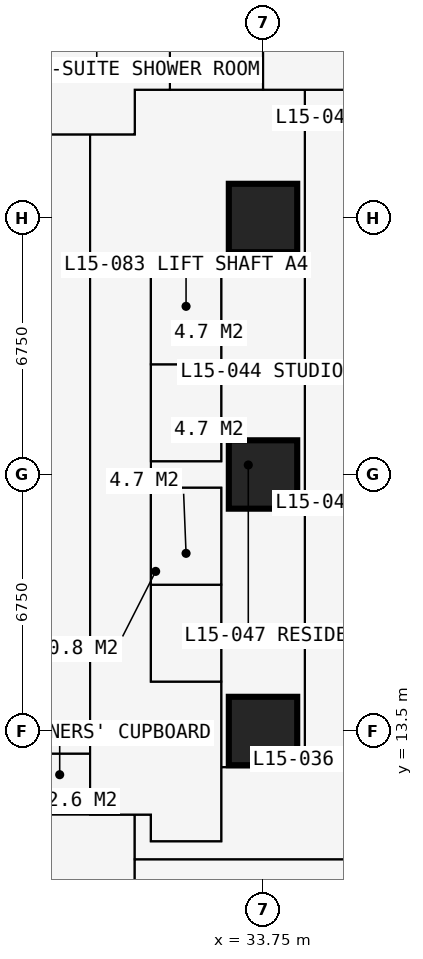
"""IFC4 building model, lengths in metres.
Left out: names, types, materials, properties, quantities, classifications, styles, units other than length and angle.
Written with IfcOpenShell. Run it as: python <this file> out.ifc"""

import sys

from ifc_helpers import new_model, si_unit, direction, frame, frame_2d, origin, origin_2d, place, context, subcontext, project, spatial, rectangle, extrude, element, fill, save


model = new_model("IFC4")
c1 = context("Model", 3, precision=1e-05, world=origin(), true_north=direction((0.0, 1.0)))
c2 = subcontext(c1, "Body", "Model", "MODEL_VIEW")
j1 = project(units=[si_unit("LENGTHUNIT", "METRE"), si_unit("PLANEANGLEUNIT", "RADIAN")], contexts=[c1])
p1 = place(None, origin())
s1 = spatial("IfcSite", under=j1, at=p1, CompositionType="ELEMENT")
p2 = place(p1, origin())
s2 = spatial("IfcBuilding", under=s1, at=p2, CompositionType="ELEMENT")
p3 = place(p2, frame((0.0, 0.0, 57.6)))
s3 = spatial("IfcBuildingStorey", under=s2, at=p3, CompositionType="ELEMENT", Elevation=57.6)
for number, where, z_axis, x_axis in (
    (1, (33.75, 13.5, 0.0), (0.0, 0.0, 1.0), (1.0, 0.0, 0.0)),
    (2, (33.75, 20.25, 0.0), (0.0, 0.0, 1.0), (1.0, 0.0, 0.0)),
    (3, (33.75, 27.0, 0.0), (0.0, 0.0, 1.0), (1.0, 0.0, 0.0)),
):
    element("IfcColumn", number, at=place(p3, frame(where, z_axis=z_axis, x_axis=x_axis)), inside=s3, PredefinedType="COLUMN", context=c2, shape_type="SweptSolid", body=[
        extrude(rectangle(XDim=1.8, YDim=1.8, at=origin_2d()), origin(), (0.0, 0.0, 1.0), 3.6),
    ])
p4 = place(p3, frame((10.125, 11.3, 0.0), z_axis=(0.0, 0.0, 1.0), x_axis=(1.0, 0.0, 0.0)))
e4 = element("IfcWall", 4, at=p4, inside=s3, PredefinedType="PARTITIONING", context=c2, shape_type="SweptSolid", body=[
    extrude(rectangle(XDim=20.675, YDim=0.15, at=frame_2d((10.337, 0.0))), origin(), (0.0, 0.0, 1.0), 3.375),
])
p5 = place(p4, frame((8.375, 0.0, 0.0)))
e5 = element("IfcOpeningElement", 5, at=p5, cuts=e4, PredefinedType="OPENING", context=c2, shape_type="SweptSolid", body=[
    extrude(rectangle(XDim=1.0, YDim=2.2, at=frame_2d((0.5, 1.1))), frame((0.0, 0.085, 0.0), z_axis=(0.0, -1.0, 0.0), x_axis=(1.0, 0.0, 0.0)), (0.0, 0.0, 1.0), 0.17),
])
p6 = place(p4, frame((10.975, 0.0, 0.0)))
e6 = element("IfcOpeningElement", 6, at=p6, cuts=e4, PredefinedType="OPENING", context=c2, shape_type="SweptSolid", body=[
    extrude(rectangle(XDim=1.0, YDim=2.2, at=frame_2d((0.5, 1.1))), frame((0.0, 0.085, 0.0), z_axis=(0.0, -1.0, 0.0), x_axis=(1.0, 0.0, 0.0)), (0.0, 0.0, 1.0), 0.17),
])
p7 = place(p4, frame((3.925, 0.0, 0.0)))
e7 = element("IfcOpeningElement", 7, at=p7, cuts=e4, PredefinedType="OPENING", context=c2, shape_type="SweptSolid", body=[
    extrude(rectangle(XDim=0.95, YDim=2.2, at=frame_2d((0.475, 1.1))), frame((0.0, 0.085, 0.0), z_axis=(0.0, -1.0, 0.0), x_axis=(1.0, 0.0, 0.0)), (0.0, 0.0, 1.0), 0.17),
])
p8 = place(p3, frame((11.3, 29.2, 0.0), z_axis=(0.0, 0.0, 1.0), x_axis=(1.0, 0.0, 0.0)))
e8 = element("IfcWall", 8, at=p8, inside=s3, PredefinedType="PARTITIONING", context=c2, shape_type="SweptSolid", body=[
    extrude(rectangle(XDim=19.075, YDim=0.15, at=frame_2d((9.538, 0.0))), origin(), (0.0, 0.0, 1.0), 3.375),
])
p9 = place(p8, frame((12.875, 0.0, 0.0)))
e9 = element("IfcOpeningElement", 9, at=p9, cuts=e8, PredefinedType="OPENING", context=c2, shape_type="SweptSolid", body=[
    extrude(rectangle(XDim=1.0, YDim=2.2, at=frame_2d((0.5, 1.1))), frame((0.0, 0.085, 0.0), z_axis=(0.0, -1.0, 0.0), x_axis=(1.0, 0.0, 0.0)), (0.0, 0.0, 1.0), 0.17),
])
p10 = place(p8, frame((10.438, 0.0, 0.0)))
e10 = element("IfcOpeningElement", 10, at=p10, cuts=e8, PredefinedType="OPENING", context=c2, shape_type="SweptSolid", body=[
    extrude(rectangle(XDim=1.0, YDim=2.2, at=frame_2d((0.5, 1.1))), frame((0.0, 0.085, 0.0), z_axis=(0.0, -1.0, 0.0), x_axis=(1.0, 0.0, 0.0)), (0.0, 0.0, 1.0), 0.17),
])
p11 = place(p8, frame((15.675, 0.0, 0.0)))
e11 = element("IfcOpeningElement", 11, at=p11, cuts=e8, PredefinedType="OPENING", context=c2, shape_type="SweptSolid", body=[
    extrude(rectangle(XDim=0.95, YDim=2.2, at=frame_2d((0.475, 1.1))), frame((0.0, 0.085, 0.0), z_axis=(0.0, -1.0, 0.0), x_axis=(1.0, 0.0, 0.0)), (0.0, 0.0, 1.0), 0.17),
])
p12 = place(p3, frame((27.6, 12.9, 0.0), z_axis=(0.0, 0.0, 1.0), x_axis=(1.0, 0.0, 0.0)))
e12 = element("IfcWall", 12, at=p12, inside=s3, PredefinedType="PARTITIONING", context=c2, shape_type="SweptSolid", body=[
    extrude(rectangle(XDim=1.6, YDim=0.15, at=frame_2d((0.8, 0.0))), origin(), (0.0, 0.0, 1.0), 2.877),
])
p13 = place(p3, frame((29.2, 11.3, 0.0), z_axis=(0.0, 0.0, 1.0), x_axis=(0.0, 1.0, 0.0)))
e13 = element("IfcWall", 13, at=p13, inside=s3, PredefinedType="PARTITIONING", context=c2, shape_type="SweptSolid", body=[
    extrude(rectangle(XDim=17.9, YDim=0.2, at=frame_2d((8.95, 0.0))), origin(), (0.0, 0.0, 1.0), 3.375),
])
p14 = place(p13, frame((8.35, 0.0, 0.0)))
e14 = element("IfcOpeningElement", 14, at=p14, cuts=e13, PredefinedType="OPENING", context=c2, shape_type="SweptSolid", body=[
    extrude(rectangle(XDim=1.2, YDim=2.2, at=frame_2d((0.6, 1.1))), frame((0.0, 0.11, 0.0), z_axis=(0.0, -1.0, 0.0), x_axis=(1.0, 0.0, 0.0)), (0.0, 0.0, 1.0), 0.22),
])
p15 = place(p3, frame((29.2, 25.7, 0.0), z_axis=(0.0, 0.0, 1.0), x_axis=(1.0, 0.0, 0.0)))
e15 = element("IfcWall", 15, at=p15, inside=s3, PredefinedType="SHEAR", context=c2, shape_type="SweptSolid", body=[
    extrude(rectangle(XDim=3.45, YDim=0.1, at=frame_2d((1.725, 0.0))), origin(), (0.0, 0.0, 1.0), 3.375),
])
p16 = place(p3, frame((30.375, -0.734, 0.0), z_axis=(0.0, 0.0, 1.0), x_axis=(0.0, 1.0, 0.0)))
e16 = element("IfcWall", 16, at=p16, inside=s3, PredefinedType="PARTITIONING", context=c2, shape_type="SweptSolid", body=[
    extrude(rectangle(XDim=12.034, YDim=0.15, at=frame_2d((6.017, 0.0))), origin(), (0.0, 0.0, 1.0), 3.375),
])
p17 = place(p3, frame((30.375, 10.125, 0.0), z_axis=(0.0, 0.0, 1.0), x_axis=(1.0, 0.0, 0.0)))
e17 = element("IfcWall", 17, at=p17, inside=s3, PredefinedType="PARTITIONING", context=c2, shape_type="SweptSolid", body=[
    extrude(rectangle(XDim=10.859, YDim=0.15, at=frame_2d((5.429, 0.0))), origin(), (0.0, 0.0, 1.0), 3.375),
])
p18 = place(p17, frame((2.5, 0.0, 0.0)))
e18 = element("IfcOpeningElement", 18, at=p18, cuts=e17, PredefinedType="OPENING", context=c2, shape_type="SweptSolid", body=[
    extrude(rectangle(XDim=1.0, YDim=2.2, at=frame_2d((0.5, 1.1))), frame((0.0, 0.085, 0.0), z_axis=(0.0, -1.0, 0.0), x_axis=(1.0, 0.0, 0.0)), (0.0, 0.0, 1.0), 0.17),
])
p19 = place(p3, frame((30.375, 29.2, 0.0), z_axis=(0.0, 0.0, 1.0), x_axis=(0.0, 1.0, 0.0)))
e19 = element("IfcWall", 19, at=p19, inside=s3, PredefinedType="PARTITIONING", context=c2, shape_type="SweptSolid", body=[
    extrude(rectangle(XDim=1.175, YDim=0.15, at=frame_2d((0.587, 0.0))), origin(), (0.0, 0.0, 1.0), 3.375),
])
p20 = place(p3, frame((30.375, 30.375, 0.0), z_axis=(0.0, 0.0, 1.0), x_axis=(1.0, 0.0, 0.0)))
e20 = element("IfcWall", 20, at=p20, inside=s3, PredefinedType="PARTITIONING", context=c2, shape_type="SweptSolid", body=[
    extrude(rectangle(XDim=10.859, YDim=0.15, at=frame_2d((5.429, 0.0))), origin(), (0.0, 0.0, 1.0), 3.375),
])
p21 = place(p3, frame((30.8, 10.6, 0.0), z_axis=(0.0, 0.0, 1.0), x_axis=(0.0, 1.0, 0.0)))
e21 = element("IfcWall", 21, at=p21, inside=s3, PredefinedType="PARTITIONING", context=c2, shape_type="SweptSolid", body=[
    extrude(rectangle(XDim=0.7, YDim=0.15, at=frame_2d((0.35, 0.0))), origin(), (0.0, 0.0, 1.0), 3.375),
])
p22 = place(p3, frame((30.8, 10.6, 0.0), z_axis=(0.0, 0.0, 1.0), x_axis=(1.0, 0.0, 0.0)))
e22 = element("IfcWall", 22, at=p22, inside=s3, PredefinedType="PARTITIONING", context=c2, shape_type="SweptSolid", body=[
    extrude(rectangle(XDim=1.85, YDim=0.15, at=frame_2d((0.925, 0.0))), origin(), (0.0, 0.0, 1.0), 3.375),
])
p23 = place(p3, frame((30.8, 14.8, 0.0), z_axis=(0.0, 0.0, 1.0), x_axis=(0.0, 1.0, 0.0)))
e23 = element("IfcWall", 23, at=p23, inside=s3, PredefinedType="PARTITIONING", context=c2, shape_type="SweptSolid", body=[
    extrude(rectangle(XDim=10.9, YDim=0.15, at=frame_2d((5.45, 0.0))), origin(), (0.0, 0.0, 1.0), 3.375),
])
p24 = place(p23, frame((0.75, 0.0, 0.0)))
e24 = element("IfcOpeningElement", 24, at=p24, cuts=e23, PredefinedType="OPENING", context=c2, shape_type="SweptSolid", body=[
    extrude(rectangle(XDim=1.1, YDim=2.2, at=frame_2d((0.55, 1.1))), frame((0.0, 0.085, 0.0), z_axis=(0.0, -1.0, 0.0), x_axis=(1.0, 0.0, 0.0)), (0.0, 0.0, 1.0), 0.17),
])
p25 = place(p23, frame((3.25, 0.0, 0.0)))
e25 = element("IfcOpeningElement", 25, at=p25, cuts=e23, PredefinedType="OPENING", context=c2, shape_type="SweptSolid", body=[
    extrude(rectangle(XDim=1.1, YDim=2.2, at=frame_2d((0.55, 1.1))), frame((0.0, 0.085, 0.0), z_axis=(0.0, -1.0, 0.0), x_axis=(1.0, 0.0, 0.0)), (0.0, 0.0, 1.0), 0.17),
])
p26 = place(p23, frame((6.5, 0.0, 0.0)))
e26 = element("IfcOpeningElement", 26, at=p26, cuts=e23, PredefinedType="OPENING", context=c2, shape_type="SweptSolid", body=[
    extrude(rectangle(XDim=1.1, YDim=2.2, at=frame_2d((0.55, 1.1))), frame((0.0, 0.085, 0.0), z_axis=(0.0, -1.0, 0.0), x_axis=(1.0, 0.0, 0.0)), (0.0, 0.0, 1.0), 0.17),
])
p27 = place(p23, frame((9.05, 0.0, 0.0)))
e27 = element("IfcOpeningElement", 27, at=p27, cuts=e23, PredefinedType="OPENING", context=c2, shape_type="SweptSolid", body=[
    extrude(rectangle(XDim=1.1, YDim=2.2, at=frame_2d((0.55, 1.1))), frame((0.0, 0.085, 0.0), z_axis=(0.0, -1.0, 0.0), x_axis=(1.0, 0.0, 0.0)), (0.0, 0.0, 1.0), 0.17),
])
for number, where, z_axis, x_axis in (
    (28, (30.8, 14.8, 0.0), (0.0, 0.0, 1.0), (1.0, 0.0, 0.0)),
    (29, (30.8, 17.35, 0.0), (0.0, 0.0, 1.0), (1.0, 0.0, 0.0)),
    (30, (30.8, 19.9, 0.0), (0.0, 0.0, 1.0), (1.0, 0.0, 0.0)),
    (31, (30.8, 20.6, 0.0), (0.0, 0.0, 1.0), (1.0, 0.0, 0.0)),
    (32, (30.8, 23.15, 0.0), (0.0, 0.0, 1.0), (1.0, 0.0, 0.0)),
):
    element("IfcWall", number, at=place(p3, frame(where, z_axis=z_axis, x_axis=x_axis)), inside=s3, PredefinedType="SHEAR", context=c2, shape_type="SweptSolid", body=[
        extrude(rectangle(XDim=1.85, YDim=0.1, at=frame_2d((0.925, 0.0))), origin(), (0.0, 0.0, 1.0), 3.375),
    ])
p28 = place(p3, frame((31.3, 30.375, 0.0), z_axis=(0.0, 0.0, 1.0), x_axis=(0.0, 1.0, 0.0)))
e33 = element("IfcWall", 33, at=p28, inside=s3, PredefinedType="PARTITIONING", context=c2, shape_type="SweptSolid", body=[
    extrude(rectangle(XDim=4.475, YDim=0.15, at=frame_2d((2.238, 0.0))), origin(), (0.0, 0.0, 1.0), 3.375),
])
p29 = place(p3, frame((32.65, 10.6, 0.0), z_axis=(0.0, 0.0, 1.0), x_axis=(0.0, 1.0, 0.0)))
e34 = element("IfcWall", 34, at=p29, inside=s3, PredefinedType="SHEAR", context=c2, shape_type="SweptSolid", body=[
    extrude(rectangle(XDim=9.3, YDim=0.1, at=frame_2d((4.65, 0.0))), origin(), (0.0, 0.0, 1.0), 3.375),
])
p30 = place(p29, frame((0.5, 0.0, 0.0)))
e35 = element("IfcOpeningElement", 35, at=p30, cuts=e34, PredefinedType="OPENING", context=c2, shape_type="SweptSolid", body=[
    extrude(rectangle(XDim=1.0, YDim=2.2, at=frame_2d((0.5, 1.1))), frame((0.0, 0.06, 0.0), z_axis=(0.0, -1.0, 0.0), x_axis=(1.0, 0.0, 0.0)), (0.0, 0.0, 1.0), 0.12),
])
p31 = place(p3, frame((32.65, 12.55, 0.0), z_axis=(0.0, 0.0, 1.0), x_axis=(1.0, 0.0, 0.0)))
e36 = element("IfcWall", 36, at=p31, inside=s3, PredefinedType="PARTITIONING", context=c2, shape_type="SweptSolid", body=[
    extrude(rectangle(XDim=2.2, YDim=0.15, at=frame_2d((1.1, 0.0))), origin(), (0.0, 0.0, 1.0), 3.375),
])
p32 = place(p3, frame((32.65, 20.6, 0.0), z_axis=(0.0, 0.0, 1.0), x_axis=(0.0, 1.0, 0.0)))
e37 = element("IfcWall", 37, at=p32, inside=s3, PredefinedType="PARTITIONING", context=c2, shape_type="SweptSolid", body=[
    extrude(rectangle(XDim=5.1, YDim=0.15, at=frame_2d((2.55, 0.0))), origin(), (0.0, 0.0, 1.0), 3.375),
])
p33 = place(p3, frame((33.75, 30.375, 0.0), z_axis=(0.0, 0.0, 1.0), x_axis=(0.0, 1.0, 0.0)))
e38 = element("IfcWall", 38, at=p33, inside=s3, PredefinedType="PARTITIONING", context=c2, shape_type="SweptSolid", body=[
    extrude(rectangle(XDim=10.859, YDim=0.15, at=frame_2d((5.429, 0.0))), origin(), (0.0, 0.0, 1.0), 2.877),
])
p34 = place(p33, frame((1.45, 0.0, 0.0)))
e39 = element("IfcOpeningElement", 39, at=p34, cuts=e38, PredefinedType="OPENING", context=c2, shape_type="SweptSolid", body=[
    extrude(rectangle(XDim=1.0, YDim=2.2, at=frame_2d((0.5, 1.1))), frame((0.0, 0.085, 0.0), z_axis=(0.0, -1.0, 0.0), x_axis=(1.0, 0.0, 0.0)), (0.0, 0.0, 1.0), 0.17),
])
p35 = place(p3, frame((34.85, 12.55, 0.0), z_axis=(0.0, 0.0, 1.0), x_axis=(0.0, 1.0, 0.0)))
e40 = element("IfcWall", 40, at=p35, inside=s3, PredefinedType="PARTITIONING", context=c2, shape_type="SweptSolid", body=[
    extrude(rectangle(XDim=17.825, YDim=0.15, at=frame_2d((8.913, 0.0))), origin(), (0.0, 0.0, 1.0), 3.375),
])
p36 = place(p35, frame((8.6, 0.0, 0.0)))
e41 = element("IfcOpeningElement", 41, at=p36, cuts=e40, PredefinedType="OPENING", context=c2, shape_type="SweptSolid", body=[
    extrude(rectangle(XDim=0.95, YDim=2.2, at=frame_2d((0.475, 1.1))), frame((0.0, 0.085, 0.0), z_axis=(0.0, -1.0, 0.0), x_axis=(1.0, 0.0, 0.0)), (0.0, 0.0, 1.0), 0.17),
])
p37 = place(p18, origin())
e42 = element("IfcDoor", 42, at=p37, inside=s3, OperationType="SINGLE_SWING_LEFT", PredefinedType="DOOR", context=c2, shape_type="SweptSolid", body=[
    extrude(rectangle(XDim=1.0, YDim=2.2, at=frame_2d((0.5, 1.1))), frame((0.0, 0.025, 0.0), z_axis=(0.0, -1.0, 0.0), x_axis=(1.0, 0.0, 0.0)), (0.0, 0.0, 1.0), 0.05),
])
fill(e18, e42)
p38 = place(p30, origin())
e43 = element("IfcDoor", 43, at=p38, inside=s3, OperationType="SINGLE_SWING_LEFT", PredefinedType="DOOR", context=c2, shape_type="SweptSolid", body=[
    extrude(rectangle(XDim=1.0, YDim=2.2, at=frame_2d((0.5, 1.1))), frame((0.0, 0.025, 0.0), z_axis=(0.0, -1.0, 0.0), x_axis=(1.0, 0.0, 0.0)), (0.0, 0.0, 1.0), 0.05),
])
fill(e35, e43)
p39 = place(p36, origin())
e44 = element("IfcDoor", 44, at=p39, inside=s3, OperationType="SINGLE_SWING_LEFT", PredefinedType="DOOR", context=c2, shape_type="SweptSolid", body=[
    extrude(rectangle(XDim=0.95, YDim=2.2, at=frame_2d((0.475, 1.1))), frame((0.0, 0.025, 0.0), z_axis=(0.0, -1.0, 0.0), x_axis=(1.0, 0.0, 0.0)), (0.0, 0.0, 1.0), 0.05),
])
fill(e41, e44)
p40 = place(p24, origin())
e45 = element("IfcDoor", 45, at=p40, inside=s3, OperationType="DOUBLE_DOOR_SLIDING", PredefinedType="DOOR", context=c2, shape_type="SweptSolid", body=[
    extrude(rectangle(XDim=1.1, YDim=2.2, at=frame_2d((0.55, 1.1))), frame((0.0, 0.025, 0.0), z_axis=(0.0, -1.0, 0.0), x_axis=(1.0, 0.0, 0.0)), (0.0, 0.0, 1.0), 0.05),
])
fill(e24, e45)
p41 = place(p25, origin())
e46 = element("IfcDoor", 46, at=p41, inside=s3, OperationType="DOUBLE_DOOR_SLIDING", PredefinedType="DOOR", context=c2, shape_type="SweptSolid", body=[
    extrude(rectangle(XDim=1.1, YDim=2.2, at=frame_2d((0.55, 1.1))), frame((0.0, 0.025, 0.0), z_axis=(0.0, -1.0, 0.0), x_axis=(1.0, 0.0, 0.0)), (0.0, 0.0, 1.0), 0.05),
])
fill(e25, e46)
p42 = place(p26, origin())
e47 = element("IfcDoor", 47, at=p42, inside=s3, OperationType="DOUBLE_DOOR_SLIDING", PredefinedType="DOOR", context=c2, shape_type="SweptSolid", body=[
    extrude(rectangle(XDim=1.1, YDim=2.2, at=frame_2d((0.55, 1.1))), frame((0.0, 0.025, 0.0), z_axis=(0.0, -1.0, 0.0), x_axis=(1.0, 0.0, 0.0)), (0.0, 0.0, 1.0), 0.05),
])
fill(e26, e47)
p43 = place(p27, origin())
e48 = element("IfcDoor", 48, at=p43, inside=s3, OperationType="DOUBLE_DOOR_SLIDING", PredefinedType="DOOR", context=c2, shape_type="SweptSolid", body=[
    extrude(rectangle(XDim=1.1, YDim=2.2, at=frame_2d((0.55, 1.1))), frame((0.0, 0.025, 0.0), z_axis=(0.0, -1.0, 0.0), x_axis=(1.0, 0.0, 0.0)), (0.0, 0.0, 1.0), 0.05),
])
fill(e27, e48)
p44 = place(p14, origin())
e49 = element("IfcDoor", 49, at=p44, inside=s3, OperationType="DOUBLE_DOOR_SINGLE_SWING", PredefinedType="DOOR", context=c2, shape_type="SweptSolid", body=[
    extrude(rectangle(XDim=1.2, YDim=2.2, at=frame_2d((0.6, 1.1))), frame((0.0, 0.025, 0.0), z_axis=(0.0, -1.0, 0.0), x_axis=(1.0, 0.0, 0.0)), (0.0, 0.0, 1.0), 0.05),
])
fill(e14, e49)
save(model, sys.argv[1])
